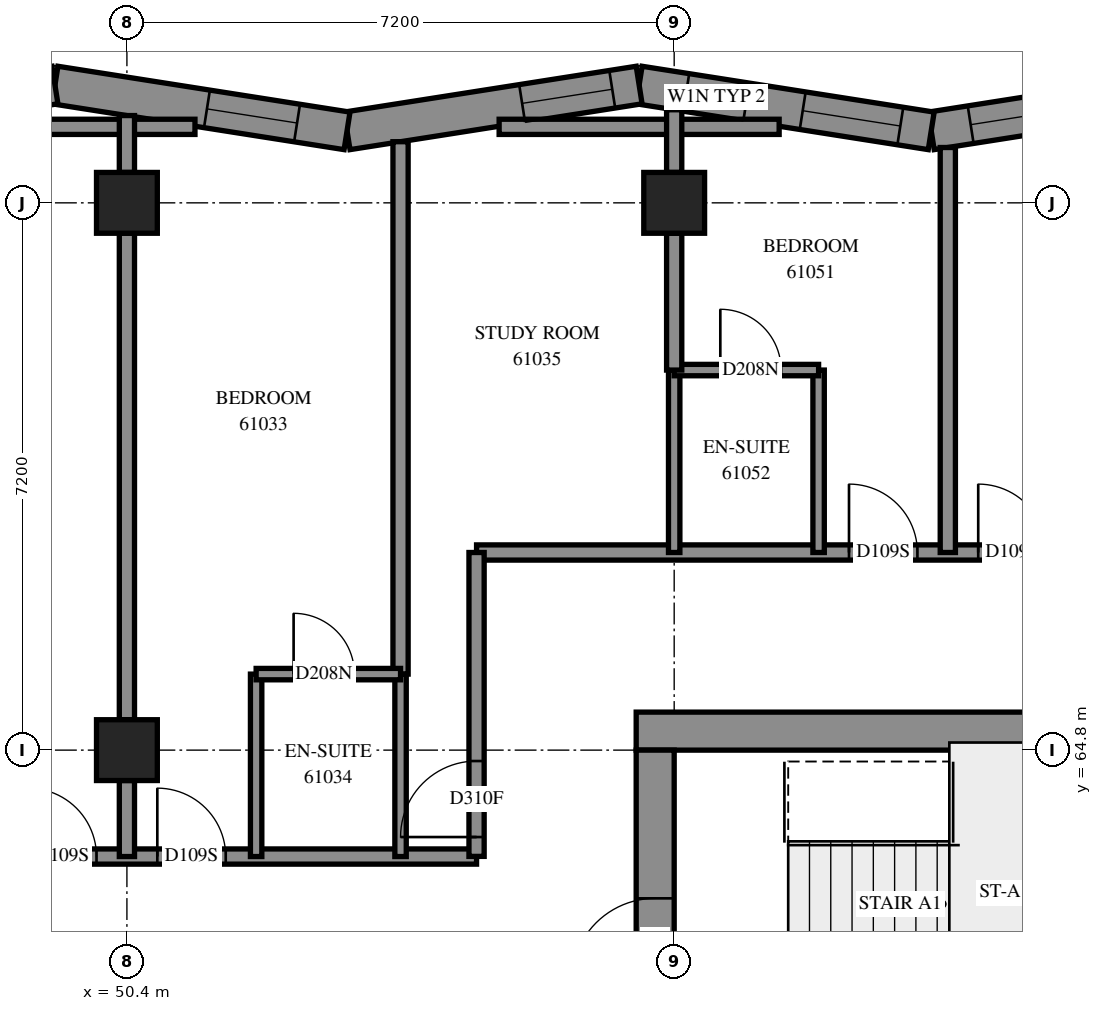
"""IFC4 building model, lengths in metres.
Left out: names, types, materials, properties, quantities, classifications, styles, units other than length and angle.
Written with IfcOpenShell. Run it as: python <this file> out.ifc"""

import sys

from ifc_helpers import new_model, si_unit, direction, frame, frame_2d, origin, origin_2d, place, context, subcontext, project, spatial, polyline, rectangle, outline, extrude, element, fill, save


model = new_model("IFC4")
c1 = context("Model", 3, precision=1e-05, world=origin(), true_north=direction((0.0, 1.0)))
c2 = subcontext(c1, "Body", "Model", "MODEL_VIEW")
j1 = project(units=[si_unit("LENGTHUNIT", "METRE"), si_unit("PLANEANGLEUNIT", "RADIAN")], contexts=[c1])
p1 = place(None, origin())
s1 = spatial("IfcSite", under=j1, at=p1, CompositionType="ELEMENT")
p2 = place(p1, origin())
s2 = spatial("IfcBuilding", under=s1, at=p2, CompositionType="ELEMENT")
p3 = place(p2, frame((0.0, 0.0, 223.6)))
s3 = spatial("IfcBuildingStorey", under=s2, at=p3, CompositionType="ELEMENT", Elevation=223.6)
for number, where, z_axis, x_axis in (
    (1, (50.4, 64.8, 0.0), (0.0, 0.0, 1.0), (1.0, 0.0, 0.0)),
    (2, (50.4, 72.0, 0.0), (0.0, 0.0, 1.0), (1.0, 0.0, 0.0)),
    (3, (57.6, 72.0, 0.0), (0.0, 0.0, 1.0), (1.0, 0.0, 0.0)),
):
    element("IfcColumn", number, at=place(p3, frame(where, z_axis=z_axis, x_axis=x_axis)), inside=s3, PredefinedType="COLUMN", context=c2, shape_type="SweptSolid", body=[
        extrude(rectangle(XDim=0.8, YDim=0.8, at=origin_2d()), origin(), (0.0, 0.0, 1.0), 3.1),
    ])
p4 = place(p3, frame((57.1, 65.05, -0.3), z_axis=(0.0, 0.0, 1.0), x_axis=(1.0, 0.0, 0.0)))
e4 = element("IfcWall", 4, at=p4, inside=s3, PredefinedType="SHEAR", context=c2, shape_type="SweptSolid", body=[
    extrude(rectangle(XDim=15.4, YDim=0.5, at=frame_2d((7.7, 0.0))), origin(), (0.0, 0.0, 1.0), 2.7),
])
p5 = place(p4, frame((10.5, 0.0, 0.3)))
e5 = element("IfcOpeningElement", 5, at=p5, cuts=e4, PredefinedType="OPENING", context=c2, shape_type="SweptSolid", body=[
    extrude(rectangle(XDim=0.8, YDim=2.1, at=frame_2d((0.4, 1.05))), frame((0.0, 0.26, 0.0), z_axis=(0.0, -1.0, 0.0), x_axis=(1.0, 0.0, 0.0)), (0.0, 0.0, 1.0), 0.52),
])
p6 = place(p3, frame((57.35, 50.4, -0.3), z_axis=(0.0, 0.0, 1.0), x_axis=(0.0, 1.0, 0.0)))
e6 = element("IfcWall", 6, at=p6, inside=s3, PredefinedType="SHEAR", context=c2, shape_type="SweptSolid", body=[
    extrude(rectangle(XDim=14.4, YDim=0.5, at=frame_2d((7.2, 0.0))), origin(), (0.0, 0.0, 1.0), 2.7),
])
p7 = place(p6, frame((4.55, 0.0, 0.3)))
e7 = element("IfcOpeningElement", 7, at=p7, cuts=e6, PredefinedType="OPENING", context=c2, shape_type="SweptSolid", body=[
    extrude(rectangle(XDim=1.1, YDim=2.1, at=frame_2d((0.55, 1.05))), frame((0.0, 0.26, 0.0), z_axis=(0.0, -1.0, 0.0), x_axis=(1.0, 0.0, 0.0)), (0.0, 0.0, 1.0), 0.52),
])
p8 = place(p6, frame((11.35, 0.0, 0.3)))
e8 = element("IfcOpeningElement", 8, at=p8, cuts=e6, PredefinedType="OPENING", context=c2, shape_type="SweptSolid", body=[
    extrude(rectangle(XDim=1.1, YDim=2.1, at=frame_2d((0.55, 1.05))), frame((0.0, 0.26, 0.0), z_axis=(0.0, -1.0, 0.0), x_axis=(1.0, 0.0, 0.0)), (0.0, 0.0, 1.0), 0.52),
])
p9 = place(p3, frame((64.824, 73.55, 0.0), z_axis=(0.0, 0.0, 1.0), x_axis=(-0.9879107269, -0.1550238552, 0.0)))
e9 = element("IfcWall", 9, at=p9, inside=s3, PredefinedType="SOLIDWALL", context=c2, shape_type="SweptSolid", body=[
    extrude(outline(polyline([(-0.039, -0.25), (3.85, -0.25), (3.929, 0.25), (0.039, 0.25), (-0.039, -0.25)])), origin(), (0.0, 0.0, 1.0), 3.1),
])
p10 = place(p9, frame((2.064, 0.0, 0.45)))
e10 = element("IfcOpeningElement", 10, at=p10, cuts=e9, PredefinedType="OPENING", context=c2, shape_type="SweptSolid", body=[
    extrude(rectangle(XDim=1.3, YDim=2.5, at=frame_2d((0.65, 1.25))), frame((0.0, 0.26, 0.0), z_axis=(0.0, -1.0, 0.0), x_axis=(1.0, 0.0, 0.0)), (0.0, 0.0, 1.0), 0.52),
])
p11 = place(p9, frame((0.328, 0.0, 0.5)))
e11 = element("IfcOpeningElement", 11, at=p11, cuts=e9, PredefinedType="OPENING", context=c2, shape_type="SweptSolid", body=[
    extrude(rectangle(XDim=1.2, YDim=2.45, at=frame_2d((0.6, 1.225))), frame((0.0, 0.26, 0.0), z_axis=(0.0, -1.0, 0.0), x_axis=(1.0, 0.0, 0.0)), (0.0, 0.0, 1.0), 0.52),
])
p12 = place(p3, frame((60.982, 72.947, 0.0), z_axis=(0.0, 0.0, 1.0), x_axis=(-0.9879113447, 0.155019918, 0.0)))
e12 = element("IfcWall", 12, at=p12, inside=s3, PredefinedType="SOLIDWALL", context=c2, shape_type="SweptSolid", body=[
    extrude(outline(polyline([(0.039, -0.25), (3.929, -0.25), (3.85, 0.25), (-0.039, 0.25), (0.039, -0.25)])), origin(), (0.0, 0.0, 1.0), 3.1),
])
p13 = place(p12, frame((0.411, 0.0, 0.45)))
e13 = element("IfcOpeningElement", 13, at=p13, cuts=e12, PredefinedType="OPENING", context=c2, shape_type="SweptSolid", body=[
    extrude(rectangle(XDim=1.3, YDim=2.5, at=frame_2d((0.65, 1.25))), frame((0.0, 0.26, 0.0), z_axis=(0.0, -1.0, 0.0), x_axis=(1.0, 0.0, 0.0)), (0.0, 0.0, 1.0), 0.52),
])
p14 = place(p12, frame((2.462, 0.0, 0.45)))
e14 = element("IfcOpeningElement", 14, at=p14, cuts=e12, PredefinedType="OPENING", context=c2, shape_type="SweptSolid", body=[
    extrude(rectangle(XDim=0.8, YDim=2.5, at=frame_2d((0.4, 1.25))), frame((0.0, 0.26, 0.0), z_axis=(0.0, -1.0, 0.0), x_axis=(1.0, 0.0, 0.0)), (0.0, 0.0, 1.0), 0.52),
])
p15 = place(p3, frame((57.139, 73.55, 0.0), z_axis=(0.0, 0.0, 1.0), x_axis=(-0.9879107269, -0.1550238552, 0.0)))
e15 = element("IfcWall", 15, at=p15, inside=s3, PredefinedType="SOLIDWALL", context=c2, shape_type="SweptSolid", body=[
    extrude(outline(polyline([(-0.039, -0.25), (3.85, -0.25), (3.929, 0.25), (0.039, 0.25), (-0.039, -0.25)])), origin(), (0.0, 0.0, 1.0), 3.1),
])
p16 = place(p15, frame((0.358, 0.0, 0.45)))
e16 = element("IfcOpeningElement", 16, at=p16, cuts=e15, PredefinedType="OPENING", context=c2, shape_type="SweptSolid", body=[
    extrude(rectangle(XDim=1.2, YDim=2.5, at=frame_2d((0.6, 1.25))), frame((0.0, 0.26, 0.0), z_axis=(0.0, -1.0, 0.0), x_axis=(1.0, 0.0, 0.0)), (0.0, 0.0, 1.0), 0.52),
])
p17 = place(p3, frame((53.296, 72.947, 0.0), z_axis=(0.0, 0.0, 1.0), x_axis=(-0.9879107269, 0.1550238552, 0.0)))
e17 = element("IfcWall", 17, at=p17, inside=s3, PredefinedType="SOLIDWALL", context=c2, shape_type="SweptSolid", body=[
    extrude(outline(polyline([(0.039, -0.25), (3.929, -0.25), (3.85, 0.25), (-0.039, 0.25), (0.039, -0.25)])), origin(), (0.0, 0.0, 1.0), 3.1),
])
p18 = place(p17, frame((0.666, 0.0, 0.45)))
e18 = element("IfcOpeningElement", 18, at=p18, cuts=e17, PredefinedType="OPENING", context=c2, shape_type="SweptSolid", body=[
    extrude(rectangle(XDim=1.2, YDim=2.5, at=frame_2d((0.6, 1.25))), frame((0.0, 0.26, 0.0), z_axis=(0.0, -1.0, 0.0), x_axis=(1.0, 0.0, 0.0)), (0.0, 0.0, 1.0), 0.52),
])
p19 = place(p3, frame((49.453, 73.55, 0.0), z_axis=(0.0, 0.0, 1.0), x_axis=(-0.9879113447, -0.155019918, 0.0)))
e19 = element("IfcWall", 19, at=p19, inside=s3, PredefinedType="SOLIDWALL", context=c2, shape_type="SweptSolid", body=[
    extrude(outline(polyline([(-0.039, -0.25), (3.85, -0.25), (3.929, 0.25), (0.039, 0.25), (-0.039, -0.25)])), origin(), (0.0, 0.0, 1.0), 3.1),
])
p20 = place(p19, frame((0.363, 0.0, 0.45)))
e20 = element("IfcOpeningElement", 20, at=p20, cuts=e19, PredefinedType="OPENING", context=c2, shape_type="SweptSolid", body=[
    extrude(rectangle(XDim=1.2, YDim=2.5, at=frame_2d((0.6, 1.25))), frame((0.0, 0.26, 0.0), z_axis=(0.0, -1.0, 0.0), x_axis=(1.0, 0.0, 0.0)), (0.0, 0.0, 1.0), 0.52),
])
p21 = place(p3, frame((55.0, 67.4, 0.0), z_axis=(0.0, 0.0, 1.0), x_axis=(1.0, 0.0, 0.0)))
e21 = element("IfcWall", 21, at=p21, inside=s3, PredefinedType="PARTITIONING", context=c2, shape_type="SweptSolid", body=[
    extrude(rectangle(XDim=19.6, YDim=0.2, at=frame_2d((9.8, 0.0))), origin(), (0.0, 0.0, 1.0), 3.1),
])
p22 = place(p21, frame((4.9, 0.0, 0.0)))
e22 = element("IfcOpeningElement", 22, at=p22, cuts=e21, PredefinedType="OPENING", context=c2, shape_type="SweptSolid", body=[
    extrude(rectangle(XDim=0.9, YDim=2.1, at=frame_2d((0.45, 1.05))), frame((0.0, 0.11, 0.0), z_axis=(0.0, -1.0, 0.0), x_axis=(1.0, 0.0, 0.0)), (0.0, 0.0, 1.0), 0.22),
])
p23 = place(p21, frame((6.6, 0.0, 0.0)))
e23 = element("IfcOpeningElement", 23, at=p23, cuts=e21, PredefinedType="OPENING", context=c2, shape_type="SweptSolid", body=[
    extrude(rectangle(XDim=0.9, YDim=2.1, at=frame_2d((0.45, 1.05))), frame((0.0, 0.11, 0.0), z_axis=(0.0, -1.0, 0.0), x_axis=(1.0, 0.0, 0.0)), (0.0, 0.0, 1.0), 0.22),
])
p24 = place(p21, frame((14.001, 0.0, 0.0)))
e24 = element("IfcOpeningElement", 24, at=p24, cuts=e21, PredefinedType="OPENING", context=c2, shape_type="SweptSolid", body=[
    extrude(rectangle(XDim=0.9, YDim=2.1, at=frame_2d((0.45, 1.05))), frame((0.0, 0.11, 0.0), z_axis=(0.0, -1.0, 0.0), x_axis=(1.0, 0.0, 0.0)), (0.0, 0.0, 1.0), 0.22),
])
p25 = place(p3, frame((40.602, 63.4, 0.0), z_axis=(0.0, 0.0, 1.0), x_axis=(1.0, 0.0, 0.0)))
e25 = element("IfcWall", 25, at=p25, inside=s3, PredefinedType="PARTITIONING", context=c2, shape_type="SweptSolid", body=[
    extrude(rectangle(XDim=14.398, YDim=0.2, at=frame_2d((7.199, 0.0))), origin(), (0.0, 0.0, 1.0), 3.1),
])
p26 = place(p25, frame((2.998, 0.0, 0.0)))
e26 = element("IfcOpeningElement", 26, at=p26, cuts=e25, PredefinedType="OPENING", context=c2, shape_type="SweptSolid", body=[
    extrude(rectangle(XDim=0.9, YDim=2.1, at=frame_2d((0.45, 1.05))), frame((0.0, 0.11, 0.0), z_axis=(0.0, -1.0, 0.0), x_axis=(1.0, 0.0, 0.0)), (0.0, 0.0, 1.0), 0.22),
])
p27 = place(p25, frame((8.498, 0.0, 0.0)))
e27 = element("IfcOpeningElement", 27, at=p27, cuts=e25, PredefinedType="OPENING", context=c2, shape_type="SweptSolid", body=[
    extrude(rectangle(XDim=0.9, YDim=2.1, at=frame_2d((0.45, 1.05))), frame((0.0, 0.11, 0.0), z_axis=(0.0, -1.0, 0.0), x_axis=(1.0, 0.0, 0.0)), (0.0, 0.0, 1.0), 0.22),
])
p28 = place(p25, frame((10.198, 0.0, 0.0)))
e28 = element("IfcOpeningElement", 28, at=p28, cuts=e25, PredefinedType="OPENING", context=c2, shape_type="SweptSolid", body=[
    extrude(rectangle(XDim=0.9, YDim=2.1, at=frame_2d((0.45, 1.05))), frame((0.0, 0.11, 0.0), z_axis=(0.0, -1.0, 0.0), x_axis=(1.0, 0.0, 0.0)), (0.0, 0.0, 1.0), 0.22),
])
p29 = place(p3, frame((54.0, 65.8, 0.0), z_axis=(0.0, 0.0, 1.0), x_axis=(0.0, 1.0, 0.0)))
e29 = element("IfcWall", 29, at=p29, inside=s3, PredefinedType="PARTITIONING", context=c2, shape_type="SweptSolid", body=[
    extrude(rectangle(XDim=7.004, YDim=0.2, at=frame_2d((3.502, 0.0))), origin(), (0.0, 0.0, 1.0), 3.1),
])
p30 = place(p3, frame((50.4, 65.2, 0.0), z_axis=(0.0, 0.0, 1.0), x_axis=(0.0, 1.0, 0.0)))
e30 = element("IfcWall", 30, at=p30, inside=s3, PredefinedType="PARTITIONING", context=c2, shape_type="SweptSolid", body=[
    extrude(rectangle(XDim=6.4, YDim=0.2, at=frame_2d((3.2, 0.0))), origin(), (0.0, 0.0, 1.0), 3.1),
])
p31 = place(p3, frame((61.2, 67.4, 0.0), z_axis=(0.0, 0.0, 1.0), x_axis=(0.0, 1.0, 0.0)))
e31 = element("IfcWall", 31, at=p31, inside=s3, PredefinedType="PARTITIONING", context=c2, shape_type="SweptSolid", body=[
    extrude(rectangle(XDim=5.328, YDim=0.2, at=frame_2d((2.664, 0.0))), origin(), (0.0, 0.0, 1.0), 3.1),
])
p32 = place(p3, frame((55.0, 63.402, 0.0), z_axis=(0.0, 0.0, 1.0), x_axis=(0.0, 1.0, 0.0)))
e32 = element("IfcWall", 32, at=p32, inside=s3, PredefinedType="PARTITIONING", context=c2, shape_type="SweptSolid", body=[
    extrude(rectangle(XDim=3.998, YDim=0.2, at=frame_2d((1.999, 0.0))), origin(), (0.0, 0.0, 1.0), 3.1),
])
p33 = place(p32, frame((0.255, 0.0, 0.0)))
e33 = element("IfcOpeningElement", 33, at=p33, cuts=e32, PredefinedType="OPENING", context=c2, shape_type="SweptSolid", body=[
    extrude(rectangle(XDim=1.0, YDim=2.1, at=frame_2d((0.5, 1.05))), frame((0.0, 0.11, 0.0), z_axis=(0.0, -1.0, 0.0), x_axis=(1.0, 0.0, 0.0)), (0.0, 0.0, 1.0), 0.22),
])
for number, where, z_axis, x_axis in (
    (34, (47.611, 73.0, 0.0), (0.0, 0.0, 1.0), (1.0, 0.0, 0.0)),
    (35, (55.297, 73.0, 0.0), (0.0, 0.0, 1.0), (1.0, 0.0, 0.0)),
):
    element("IfcWall", number, at=place(p3, frame(where, z_axis=z_axis, x_axis=x_axis)), inside=s3, PredefinedType="PARTITIONING", context=c2, shape_type="SweptSolid", body=[
        extrude(rectangle(XDim=3.684, YDim=0.2, at=frame_2d((1.842, 0.0))), origin(), (0.0, 0.0, 1.0), 3.1),
    ])
for number, where, z_axis, x_axis in (
    (36, (52.1, 63.4, 0.0), (0.0, 0.0, 1.0), (0.0, 1.0, 0.0)),
    (37, (54.0, 63.4, 0.0), (0.0, 0.0, 1.0), (0.0, 1.0, 0.0)),
    (38, (59.5, 67.4, 0.0), (0.0, 0.0, 1.0), (0.0, 1.0, 0.0)),
    (39, (57.6, 67.4, 0.0), (0.0, 0.0, 1.0), (0.0, 1.0, 0.0)),
):
    element("IfcWall", number, at=place(p3, frame(where, z_axis=z_axis, x_axis=x_axis)), inside=s3, PredefinedType="PARTITIONING", context=c2, shape_type="SweptSolid", body=[
        extrude(rectangle(XDim=2.4, YDim=0.15, at=frame_2d((1.2, 0.0))), origin(), (0.0, 0.0, 1.0), 3.1),
    ])
p34 = place(p3, frame((52.1, 65.8, 0.0), z_axis=(0.0, 0.0, 1.0), x_axis=(1.0, 0.0, 0.0)))
e40 = element("IfcWall", 40, at=p34, inside=s3, PredefinedType="PARTITIONING", context=c2, shape_type="SweptSolid", body=[
    extrude(rectangle(XDim=1.9, YDim=0.15, at=frame_2d((0.95, 0.0))), origin(), (0.0, 0.0, 1.0), 3.1),
])
p35 = place(p34, frame((0.493, 0.0, 0.0)))
e41 = element("IfcOpeningElement", 41, at=p35, cuts=e40, PredefinedType="OPENING", context=c2, shape_type="SweptSolid", body=[
    extrude(rectangle(XDim=0.8, YDim=2.1, at=frame_2d((0.4, 1.05))), frame((0.0, 0.085, 0.0), z_axis=(0.0, -1.0, 0.0), x_axis=(1.0, 0.0, 0.0)), (0.0, 0.0, 1.0), 0.17),
])
p36 = place(p3, frame((57.6, 69.8, 0.0), z_axis=(0.0, 0.0, 1.0), x_axis=(1.0, 0.0, 0.0)))
e42 = element("IfcWall", 42, at=p36, inside=s3, PredefinedType="PARTITIONING", context=c2, shape_type="SweptSolid", body=[
    extrude(rectangle(XDim=1.9, YDim=0.15, at=frame_2d((0.95, 0.0))), origin(), (0.0, 0.0, 1.0), 3.1),
])
p37 = place(p36, frame((0.607, 0.0, 0.0)))
e43 = element("IfcOpeningElement", 43, at=p37, cuts=e42, PredefinedType="OPENING", context=c2, shape_type="SweptSolid", body=[
    extrude(rectangle(XDim=0.8, YDim=2.1, at=frame_2d((0.4, 1.05))), frame((0.0, 0.085, 0.0), z_axis=(0.0, -1.0, 0.0), x_axis=(1.0, 0.0, 0.0)), (0.0, 0.0, 1.0), 0.17),
])
p38 = place(p3, frame((57.6, 69.8, 0.0), z_axis=(0.0, 0.0, 1.0), x_axis=(0.0, 1.0, 0.0)))
e44 = element("IfcWall", 44, at=p38, inside=s3, PredefinedType="PARTITIONING", context=c2, shape_type="SweptSolid", body=[
    extrude(rectangle(XDim=1.8, YDim=0.2, at=frame_2d((0.9, 0.0))), origin(), (0.0, 0.0, 1.0), 3.1),
])
p39 = place(p3, frame((50.4, 63.4, 0.0), z_axis=(0.0, 0.0, 1.0), x_axis=(0.0, 1.0, 0.0)))
e45 = element("IfcWall", 45, at=p39, inside=s3, PredefinedType="PARTITIONING", context=c2, shape_type="SweptSolid", body=[
    extrude(rectangle(XDim=1.0, YDim=0.2, at=frame_2d((0.5, 0.0))), origin(), (0.0, 0.0, 1.0), 3.1),
])
p40 = place(p3, frame((50.4, 72.4, 0.0), z_axis=(0.0, 0.0, 1.0), x_axis=(0.0, 1.0, 0.0)))
e46 = element("IfcWall", 46, at=p40, inside=s3, PredefinedType="PARTITIONING", context=c2, shape_type="SweptSolid", body=[
    extrude(rectangle(XDim=0.748, YDim=0.2, at=frame_2d((0.374, 0.0))), origin(), (0.0, 0.0, 1.0), 3.1),
])
p41 = place(p3, frame((57.6, 72.4, 0.0), z_axis=(0.0, 0.0, 1.0), x_axis=(0.0, 1.0, 0.0)))
e47 = element("IfcWall", 47, at=p41, inside=s3, PredefinedType="PARTITIONING", context=c2, shape_type="SweptSolid", body=[
    extrude(rectangle(XDim=0.825, YDim=0.2, at=frame_2d((0.412, 0.0))), origin(), (0.0, 0.0, 1.0), 3.1),
])
p42 = place(p10, origin())
e48 = element("IfcWindow", 48, at=p42, inside=s3, PartitioningType="SINGLE_PANEL", PredefinedType="WINDOW", context=c2, shape_type="SweptSolid", body=[
    extrude(rectangle(XDim=1.3, YDim=2.5, at=frame_2d((0.65, 1.25))), frame((0.0, 0.18, 0.0), z_axis=(0.0, -1.0, 0.0), x_axis=(1.0, 0.0, 0.0)), (0.0, 0.0, 1.0), 0.06),
])
fill(e10, e48)
p43 = place(p13, origin())
e49 = element("IfcWindow", 49, at=p43, inside=s3, PartitioningType="SINGLE_PANEL", PredefinedType="WINDOW", context=c2, shape_type="SweptSolid", body=[
    extrude(rectangle(XDim=1.3, YDim=2.5, at=frame_2d((0.65, 1.25))), frame((0.0, 0.18, 0.0), z_axis=(0.0, -1.0, 0.0), x_axis=(1.0, 0.0, 0.0)), (0.0, 0.0, 1.0), 0.06),
])
fill(e13, e49)
p44 = place(p16, origin())
e50 = element("IfcWindow", 50, at=p44, inside=s3, PartitioningType="SINGLE_PANEL", PredefinedType="WINDOW", context=c2, shape_type="SweptSolid", body=[
    extrude(rectangle(XDim=1.2, YDim=2.5, at=frame_2d((0.6, 1.25))), frame((0.0, 0.18, 0.0), z_axis=(0.0, -1.0, 0.0), x_axis=(1.0, 0.0, 0.0)), (0.0, 0.0, 1.0), 0.06),
])
fill(e16, e50)
p45 = place(p18, origin())
e51 = element("IfcWindow", 51, at=p45, inside=s3, PartitioningType="SINGLE_PANEL", PredefinedType="WINDOW", context=c2, shape_type="SweptSolid", body=[
    extrude(rectangle(XDim=1.2, YDim=2.5, at=frame_2d((0.6, 1.25))), frame((0.0, 0.18, 0.0), z_axis=(0.0, -1.0, 0.0), x_axis=(1.0, 0.0, 0.0)), (0.0, 0.0, 1.0), 0.06),
])
fill(e18, e51)
p46 = place(p8, origin())
e52 = element("IfcDoor", 52, at=p46, inside=s3, OperationType="SINGLE_SWING_LEFT", PredefinedType="DOOR", context=c2, shape_type="SweptSolid", body=[
    extrude(rectangle(XDim=1.1, YDim=2.1, at=frame_2d((0.55, 1.05))), frame((0.0, 0.025, 0.0), z_axis=(0.0, -1.0, 0.0), x_axis=(1.0, 0.0, 0.0)), (0.0, 0.0, 1.0), 0.05),
])
fill(e8, e52)
p47 = place(p27, origin())
e53 = element("IfcDoor", 53, at=p47, inside=s3, OperationType="SINGLE_SWING_LEFT", PredefinedType="DOOR", context=c2, shape_type="SweptSolid", body=[
    extrude(rectangle(XDim=0.9, YDim=2.1, at=frame_2d((0.45, 1.05))), frame((0.0, 0.025, 0.0), z_axis=(0.0, -1.0, 0.0), x_axis=(1.0, 0.0, 0.0)), (0.0, 0.0, 1.0), 0.05),
])
fill(e27, e53)
p48 = place(p28, origin())
e54 = element("IfcDoor", 54, at=p48, inside=s3, OperationType="SINGLE_SWING_RIGHT", PredefinedType="DOOR", context=c2, shape_type="SweptSolid", body=[
    extrude(rectangle(XDim=0.9, YDim=2.1, at=frame_2d((0.45, 1.05))), frame((0.0, 0.025, 0.0), z_axis=(0.0, -1.0, 0.0), x_axis=(1.0, 0.0, 0.0)), (0.0, 0.0, 1.0), 0.05),
])
fill(e28, e54)
p49 = place(p35, origin())
e55 = element("IfcDoor", 55, at=p49, inside=s3, OperationType="SINGLE_SWING_RIGHT", PredefinedType="DOOR", context=c2, shape_type="SweptSolid", body=[
    extrude(rectangle(XDim=0.8, YDim=2.1, at=frame_2d((0.4, 1.05))), frame((0.0, 0.025, 0.0), z_axis=(0.0, -1.0, 0.0), x_axis=(1.0, 0.0, 0.0)), (0.0, 0.0, 1.0), 0.05),
])
fill(e41, e55)
p50 = place(p33, origin())
e56 = element("IfcDoor", 56, at=p50, inside=s3, OperationType="SINGLE_SWING_LEFT", PredefinedType="DOOR", context=c2, shape_type="SweptSolid", body=[
    extrude(rectangle(XDim=1.0, YDim=2.1, at=frame_2d((0.5, 1.05))), frame((0.0, 0.025, 0.0), z_axis=(0.0, -1.0, 0.0), x_axis=(1.0, 0.0, 0.0)), (0.0, 0.0, 1.0), 0.05),
])
fill(e33, e56)
p51 = place(p22, origin())
e57 = element("IfcDoor", 57, at=p51, inside=s3, OperationType="SINGLE_SWING_RIGHT", PredefinedType="DOOR", context=c2, shape_type="SweptSolid", body=[
    extrude(rectangle(XDim=0.9, YDim=2.1, at=frame_2d((0.45, 1.05))), frame((0.0, 0.025, 0.0), z_axis=(0.0, -1.0, 0.0), x_axis=(1.0, 0.0, 0.0)), (0.0, 0.0, 1.0), 0.05),
])
fill(e22, e57)
p52 = place(p37, origin())
e58 = element("IfcDoor", 58, at=p52, inside=s3, OperationType="SINGLE_SWING_RIGHT", PredefinedType="DOOR", context=c2, shape_type="SweptSolid", body=[
    extrude(rectangle(XDim=0.8, YDim=2.1, at=frame_2d((0.4, 1.05))), frame((0.0, 0.025, 0.0), z_axis=(0.0, -1.0, 0.0), x_axis=(1.0, 0.0, 0.0)), (0.0, 0.0, 1.0), 0.05),
])
fill(e43, e58)
p53 = place(p23, origin())
e59 = element("IfcDoor", 59, at=p53, inside=s3, OperationType="SINGLE_SWING_LEFT", PredefinedType="DOOR", context=c2, shape_type="SweptSolid", body=[
    extrude(rectangle(XDim=0.9, YDim=2.1, at=frame_2d((0.45, 1.05))), frame((0.0, 0.025, 0.0), z_axis=(0.0, -1.0, 0.0), x_axis=(1.0, 0.0, 0.0)), (0.0, 0.0, 1.0), 0.05),
])
fill(e23, e59)
p54 = place(p14, origin())
e60 = element("IfcWindow", 60, at=p54, inside=s3, PartitioningType="SINGLE_PANEL", PredefinedType="WINDOW", context=c2, shape_type="SweptSolid", body=[
    extrude(rectangle(XDim=0.8, YDim=2.5, at=frame_2d((0.4, 1.25))), frame((0.0, 0.18, 0.0), z_axis=(0.0, -1.0, 0.0), x_axis=(1.0, 0.0, 0.0)), (0.0, 0.0, 1.0), 0.06),
])
fill(e14, e60)
save(model, sys.argv[1])
